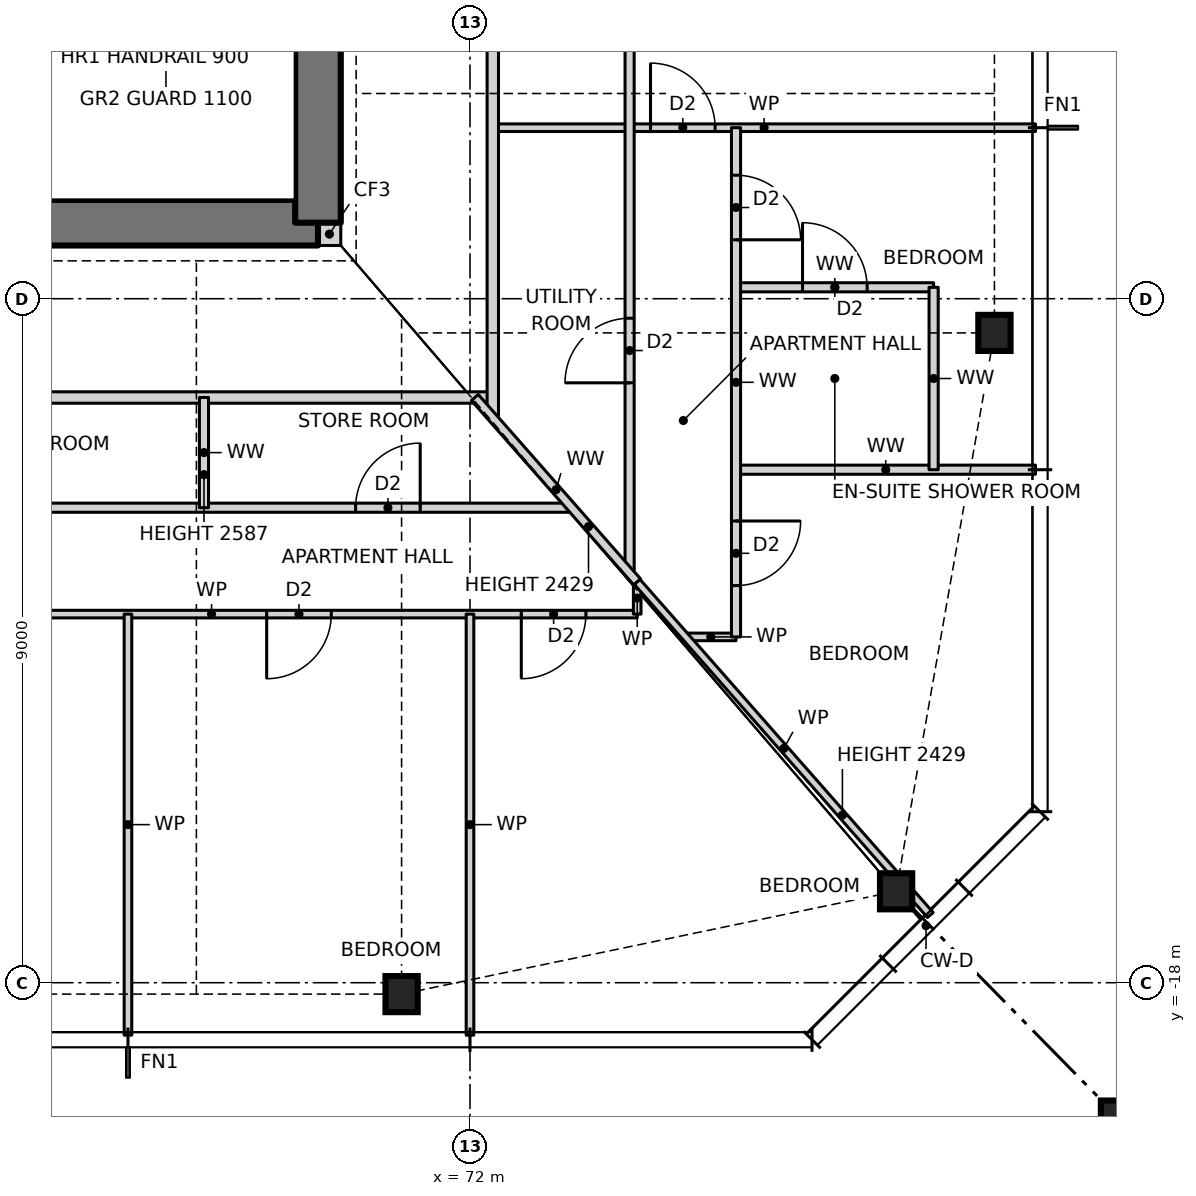
"""IFC4 building model, lengths in metres.
Left out: names, types, materials, properties, quantities, classifications, styles, units other than length and angle.
Written with IfcOpenShell. Run it as: python <this file> out.ifc"""

import sys

from ifc_helpers import new_model, si_unit, direction, frame, frame_2d, origin, origin_2d, place, context, subcontext, project, spatial, rectangle, hollow_rectangle, i_section, extrude, element, fill, save


model = new_model("IFC4")
c1 = context("Model", 3, precision=1e-05, world=origin(), true_north=direction((0.0, 1.0)))
c2 = subcontext(c1, "Body", "Model", "MODEL_VIEW")
j1 = project(units=[si_unit("LENGTHUNIT", "METRE"), si_unit("PLANEANGLEUNIT", "RADIAN")], contexts=[c1])
p1 = place(None, origin())
s1 = spatial("IfcSite", under=j1, at=p1, CompositionType="ELEMENT")
p2 = place(p1, origin())
s2 = spatial("IfcBuilding", under=s1, at=p2, CompositionType="ELEMENT")
p3 = place(p2, frame((0.0, 0.0, 46.5)))
s3 = spatial("IfcBuildingStorey", under=s2, at=p3, CompositionType="ELEMENT", Elevation=46.5)
for number, where, z_axis, x_axis in (
    (1, (71.1, -18.15, 0.0), (0.0, 0.0, 1.0), (1.0, 0.0, 0.0)),
    (2, (77.606, -16.797, 0.0), (0.0, 0.0, 1.0), (1.0, 0.0, 0.0)),
    (3, (78.9, -9.45, 0.0), (0.0, 0.0, 1.0), (1.0, 0.0, 0.0)),
):
    element("IfcColumn", number, at=place(p3, frame(where, z_axis=z_axis, x_axis=x_axis)), inside=s3, PredefinedType="COLUMN", context=c2, shape_type="SweptSolid", body=[
        extrude(i_section(OverallWidth=0.424, OverallDepth=0.475, WebThickness=0.048, FlangeThickness=0.077, at=origin_2d()), origin(), (0.0, 0.0, 1.0), 3.5),
    ])
p4 = place(p3, frame((80.9, -20.15, 0.0), z_axis=(0.0, 0.0, 1.0), x_axis=(1.0, 0.0, 0.0)))
e4 = element("IfcColumn", 4, at=p4, inside=s3, PredefinedType="COLUMN", context=c2, shape_type="SweptSolid", body=[
    extrude(hollow_rectangle(XDim=1.2, YDim=1.2, WallThickness=0.07, at=origin_2d()), origin(), (0.0, 0.0, 1.0), 3.5),
])
p5 = place(p3, frame((70.0, -8.15, 0.0), z_axis=(0.0, 0.0, 1.0), x_axis=(1.0, 0.0, 0.0)))
e5 = element("IfcWall", 5, at=p5, inside=s3, PredefinedType="SOLIDWALL", context=c2, shape_type="SweptSolid", body=[
    extrude(rectangle(XDim=0.3, YDim=0.3, at=frame_2d((0.15, 0.0))), origin(), (0.0, 0.0, 1.0), 3.5),
])
p6 = place(p3, frame((56.0, -8.0, 0.0), z_axis=(0.0, 0.0, 1.0), x_axis=(1.0, 0.0, 0.0)))
e6 = element("IfcWall", 6, at=p6, inside=s3, PredefinedType="SHEAR", context=c2, shape_type="SweptSolid", body=[
    extrude(rectangle(XDim=14.0, YDim=0.6, at=frame_2d((7.0, 0.0))), origin(), (0.0, 0.0, 1.0), 3.5),
])
p7 = place(p6, frame((2.7, 0.0, 0.0)))
e7 = element("IfcOpeningElement", 7, at=p7, cuts=e6, PredefinedType="OPENING", context=c2, shape_type="SweptSolid", body=[
    extrude(rectangle(XDim=0.9, YDim=2.1, at=frame_2d((0.45, 1.05))), frame((0.0, 0.31, 0.0), z_axis=(0.0, -1.0, 0.0), x_axis=(1.0, 0.0, 0.0)), (0.0, 0.0, 1.0), 0.62),
])
p8 = place(p6, frame((7.7, 0.0, 0.0)))
e8 = element("IfcOpeningElement", 8, at=p8, cuts=e6, PredefinedType="OPENING", context=c2, shape_type="SweptSolid", body=[
    extrude(rectangle(XDim=0.9, YDim=2.1, at=frame_2d((0.45, 1.05))), frame((0.0, 0.31, 0.0), z_axis=(0.0, -1.0, 0.0), x_axis=(1.0, 0.0, 0.0)), (0.0, 0.0, 1.0), 0.62),
])
p9 = place(p3, frame((70.0, -8.0, 0.0), z_axis=(0.0, 0.0, 1.0), x_axis=(0.0, 1.0, 0.0)))
e9 = element("IfcWall", 9, at=p9, inside=s3, PredefinedType="SHEAR", context=c2, shape_type="SweptSolid", body=[
    extrude(rectangle(XDim=16.0, YDim=0.6, at=frame_2d((8.0, 0.0))), origin(), (0.0, 0.0, 1.0), 3.5),
])
p10 = place(p9, frame((7.5, 0.0, 0.0)))
e10 = element("IfcOpeningElement", 10, at=p10, cuts=e9, PredefinedType="OPENING", context=c2, shape_type="SweptSolid", body=[
    extrude(rectangle(XDim=1.0, YDim=2.1, at=frame_2d((0.5, 1.05))), frame((0.0, 0.31, 0.0), z_axis=(0.0, -1.0, 0.0), x_axis=(1.0, 0.0, 0.0)), (0.0, 0.0, 1.0), 0.62),
])
p11 = place(p3, frame((74.836, -13.45, 0.0), z_axis=(0.0, 0.0, 1.0), x_axis=(1.0, 0.0, 0.0)))
e11 = element("IfcWall", 11, at=p11, inside=s3, PredefinedType="PARTITIONING", context=c2, shape_type="SweptSolid", body=[
    extrude(rectangle(XDim=0.664, YDim=0.1, at=frame_2d((0.332, 0.0))), origin(), (0.0, 0.0, 1.0), 3.27),
])
p12 = place(p3, frame((63.0, -13.15, 0.0), z_axis=(0.0, 0.0, 1.0), x_axis=(1.0, 0.0, 0.0)))
e12 = element("IfcWall", 12, at=p12, inside=s3, PredefinedType="PARTITIONING", context=c2, shape_type="SweptSolid", body=[
    extrude(rectangle(XDim=11.2, YDim=0.1, at=frame_2d((5.6, 0.0))), origin(), (0.0, 0.0, 1.0), 3.27),
])
p13 = place(p12, frame((1.825, 0.0, 0.0)))
e13 = element("IfcOpeningElement", 13, at=p13, cuts=e12, PredefinedType="OPENING", context=c2, shape_type="SweptSolid", body=[
    extrude(rectangle(XDim=0.85, YDim=2.1, at=frame_2d((0.425, 1.05))), frame((0.0, 0.06, 0.0), z_axis=(0.0, -1.0, 0.0), x_axis=(1.0, 0.0, 0.0)), (0.0, 0.0, 1.0), 0.12),
])
p14 = place(p12, frame((6.325, 0.0, 0.0)))
e14 = element("IfcOpeningElement", 14, at=p14, cuts=e12, PredefinedType="OPENING", context=c2, shape_type="SweptSolid", body=[
    extrude(rectangle(XDim=0.85, YDim=2.1, at=frame_2d((0.425, 1.05))), frame((0.0, 0.06, 0.0), z_axis=(0.0, -1.0, 0.0), x_axis=(1.0, 0.0, 0.0)), (0.0, 0.0, 1.0), 0.12),
])
p15 = place(p12, frame((9.675, 0.0, 0.0)))
e15 = element("IfcOpeningElement", 15, at=p15, cuts=e12, PredefinedType="OPENING", context=c2, shape_type="SweptSolid", body=[
    extrude(rectangle(XDim=0.85, YDim=2.1, at=frame_2d((0.425, 1.05))), frame((0.0, 0.06, 0.0), z_axis=(0.0, -1.0, 0.0), x_axis=(1.0, 0.0, 0.0)), (0.0, 0.0, 1.0), 0.12),
])
p16 = place(p3, frame((54.0, -11.75, 0.0), z_axis=(0.0, 0.0, 1.0), x_axis=(1.0, 0.0, 0.0)))
e16 = element("IfcWall", 16, at=p16, inside=s3, PredefinedType="PARTITIONING", context=c2, shape_type="SweptSolid", body=[
    extrude(rectangle(XDim=19.34, YDim=0.12, at=frame_2d((9.67, 0.0))), origin(), (0.0, 0.0, 1.0), 3.27),
])
p17 = place(p16, frame((1.375, 0.0, 0.0)))
e17 = element("IfcOpeningElement", 17, at=p17, cuts=e16, PredefinedType="OPENING", context=c2, shape_type="SweptSolid", body=[
    extrude(rectangle(XDim=0.85, YDim=2.1, at=frame_2d((0.425, 1.05))), frame((0.0, 0.07, 0.0), z_axis=(0.0, -1.0, 0.0), x_axis=(1.0, 0.0, 0.0)), (0.0, 0.0, 1.0), 0.14),
])
p18 = place(p16, frame((4.575, 0.0, 0.0)))
e18 = element("IfcOpeningElement", 18, at=p18, cuts=e16, PredefinedType="OPENING", context=c2, shape_type="SweptSolid", body=[
    extrude(rectangle(XDim=0.85, YDim=2.1, at=frame_2d((0.425, 1.05))), frame((0.0, 0.07, 0.0), z_axis=(0.0, -1.0, 0.0), x_axis=(1.0, 0.0, 0.0)), (0.0, 0.0, 1.0), 0.14),
])
p19 = place(p16, frame((11.325, 0.0, 0.0)))
e19 = element("IfcOpeningElement", 19, at=p19, cuts=e16, PredefinedType="OPENING", context=c2, shape_type="SweptSolid", body=[
    extrude(rectangle(XDim=0.85, YDim=2.1, at=frame_2d((0.425, 1.05))), frame((0.0, 0.07, 0.0), z_axis=(0.0, -1.0, 0.0), x_axis=(1.0, 0.0, 0.0)), (0.0, 0.0, 1.0), 0.14),
])
p20 = place(p16, frame((16.495, 0.0, 0.0)))
e20 = element("IfcOpeningElement", 20, at=p20, cuts=e16, PredefinedType="OPENING", context=c2, shape_type="SweptSolid", body=[
    extrude(rectangle(XDim=0.85, YDim=2.1, at=frame_2d((0.425, 1.05))), frame((0.0, 0.07, 0.0), z_axis=(0.0, -1.0, 0.0), x_axis=(1.0, 0.0, 0.0)), (0.0, 0.0, 1.0), 0.14),
])
p21 = place(p3, frame((75.5, -11.25, 0.0), z_axis=(0.0, 0.0, 1.0), x_axis=(1.0, 0.0, 0.0)))
e21 = element("IfcWall", 21, at=p21, inside=s3, PredefinedType="PARTITIONING", context=c2, shape_type="SweptSolid", body=[
    extrude(rectangle(XDim=3.94, YDim=0.12, at=frame_2d((1.97, 0.0))), origin(), (0.0, 0.0, 1.0), 3.27),
])
p22 = place(p3, frame((53.7, -10.3, 0.0), z_axis=(0.0, 0.0, 1.0), x_axis=(1.0, 0.0, 0.0)))
e22 = element("IfcWall", 22, at=p22, inside=s3, PredefinedType="PARTITIONING", context=c2, shape_type="SweptSolid", body=[
    extrude(rectangle(XDim=18.6, YDim=0.15, at=frame_2d((9.3, 0.0))), origin(), (0.0, 0.0, 1.0), 3.27),
])
p23 = place(p22, frame((4.8, 0.0, 0.0)))
e23 = element("IfcOpeningElement", 23, at=p23, cuts=e22, PredefinedType="OPENING", context=c2, shape_type="SweptSolid", body=[
    extrude(rectangle(XDim=1.0, YDim=2.1, at=frame_2d((0.5, 1.05))), frame((0.0, 0.085, 0.0), z_axis=(0.0, -1.0, 0.0), x_axis=(1.0, 0.0, 0.0)), (0.0, 0.0, 1.0), 0.17),
])
p24 = place(p3, frame((75.5, -8.85, 0.0), z_axis=(0.0, 0.0, 1.0), x_axis=(1.0, 0.0, 0.0)))
e24 = element("IfcWall", 24, at=p24, inside=s3, PredefinedType="PARTITIONING", context=c2, shape_type="SweptSolid", body=[
    extrude(rectangle(XDim=2.6, YDim=0.12, at=frame_2d((1.3, 0.0))), origin(), (0.0, 0.0, 1.0), 3.27),
])
p25 = place(p24, frame((0.875, 0.0, 0.0)))
e25 = element("IfcOpeningElement", 25, at=p25, cuts=e24, PredefinedType="OPENING", context=c2, shape_type="SweptSolid", body=[
    extrude(rectangle(XDim=0.85, YDim=2.1, at=frame_2d((0.425, 1.05))), frame((0.0, 0.07, 0.0), z_axis=(0.0, -1.0, 0.0), x_axis=(1.0, 0.0, 0.0)), (0.0, 0.0, 1.0), 0.14),
])
p26 = place(p3, frame((72.3, -6.75, 0.0), z_axis=(0.0, 0.0, 1.0), x_axis=(1.0, 0.0, 0.0)))
e26 = element("IfcWall", 26, at=p26, inside=s3, PredefinedType="PARTITIONING", context=c2, shape_type="SweptSolid", body=[
    extrude(rectangle(XDim=7.14, YDim=0.1, at=frame_2d((3.57, 0.0))), origin(), (0.0, 0.0, 1.0), 3.27),
])
p27 = place(p26, frame((2.075, 0.0, 0.0)))
e27 = element("IfcOpeningElement", 27, at=p27, cuts=e26, PredefinedType="OPENING", context=c2, shape_type="SweptSolid", body=[
    extrude(rectangle(XDim=0.85, YDim=2.1, at=frame_2d((0.425, 1.05))), frame((0.0, 0.06, 0.0), z_axis=(0.0, -1.0, 0.0), x_axis=(1.0, 0.0, 0.0)), (0.0, 0.0, 1.0), 0.12),
])
p28 = place(p3, frame((78.1, -11.25, 0.0), z_axis=(0.0, 0.0, 1.0), x_axis=(0.0, 1.0, 0.0)))
e28 = element("IfcWall", 28, at=p28, inside=s3, PredefinedType="PARTITIONING", context=c2, shape_type="SweptSolid", body=[
    extrude(rectangle(XDim=2.4, YDim=0.12, at=frame_2d((1.2, 0.0))), origin(), (0.0, 0.0, 1.0), 3.27),
])
p29 = place(p3, frame((75.5, -13.45, 0.0), z_axis=(0.0, 0.0, 1.0), x_axis=(0.0, 1.0, 0.0)))
e29 = element("IfcWall", 29, at=p29, inside=s3, PredefinedType="PARTITIONING", context=c2, shape_type="SweptSolid", body=[
    extrude(rectangle(XDim=6.7, YDim=0.12, at=frame_2d((3.35, 0.0))), origin(), (0.0, 0.0, 1.0), 3.27),
])
p30 = place(p29, frame((5.225, 0.0, 0.0)))
e30 = element("IfcOpeningElement", 30, at=p30, cuts=e29, PredefinedType="OPENING", context=c2, shape_type="SweptSolid", body=[
    extrude(rectangle(XDim=0.85, YDim=2.1, at=frame_2d((0.425, 1.05))), frame((0.0, 0.07, 0.0), z_axis=(0.0, -1.0, 0.0), x_axis=(1.0, 0.0, 0.0)), (0.0, 0.0, 1.0), 0.14),
])
p31 = place(p29, frame((0.675, 0.0, 0.0)))
e31 = element("IfcOpeningElement", 31, at=p31, cuts=e29, PredefinedType="OPENING", context=c2, shape_type="SweptSolid", body=[
    extrude(rectangle(XDim=0.85, YDim=2.1, at=frame_2d((0.425, 1.05))), frame((0.0, 0.07, 0.0), z_axis=(0.0, -1.0, 0.0), x_axis=(1.0, 0.0, 0.0)), (0.0, 0.0, 1.0), 0.14),
])
p32 = place(p3, frame((74.2, -13.15, 0.0), z_axis=(0.0, 0.0, 1.0), x_axis=(0.0, 1.0, 0.0)))
e32 = element("IfcWall", 32, at=p32, inside=s3, PredefinedType="PARTITIONING", context=c2, shape_type="SweptSolid", body=[
    extrude(rectangle(XDim=0.423, YDim=0.1, at=frame_2d((0.211, 0.0))), origin(), (0.0, 0.0, 1.0), 3.27),
])
p33 = place(p3, frame((74.1, -12.614, 0.0), z_axis=(0.0, 0.0, 1.0), x_axis=(0.0, 1.0, 0.0)))
e33 = element("IfcWall", 33, at=p33, inside=s3, PredefinedType="PARTITIONING", context=c2, shape_type="SweptSolid", body=[
    extrude(rectangle(XDim=25.228, YDim=0.12, at=frame_2d((12.614, 0.0))), origin(), (0.0, 0.0, 1.0), 3.27),
])
p34 = place(p33, frame((7.239, 0.0, 0.0)))
e34 = element("IfcOpeningElement", 34, at=p34, cuts=e33, PredefinedType="OPENING", context=c2, shape_type="SweptSolid", body=[
    extrude(rectangle(XDim=0.85, YDim=2.1, at=frame_2d((0.425, 1.05))), frame((0.0, 0.07, 0.0), z_axis=(0.0, -1.0, 0.0), x_axis=(1.0, 0.0, 0.0)), (0.0, 0.0, 1.0), 0.14),
])
p35 = place(p33, frame((10.439, 0.0, 0.0)))
e35 = element("IfcOpeningElement", 35, at=p35, cuts=e33, PredefinedType="OPENING", context=c2, shape_type="SweptSolid", body=[
    extrude(rectangle(XDim=0.85, YDim=2.1, at=frame_2d((0.425, 1.05))), frame((0.0, 0.07, 0.0), z_axis=(0.0, -1.0, 0.0), x_axis=(1.0, 0.0, 0.0)), (0.0, 0.0, 1.0), 0.14),
])
p36 = place(p33, frame((2.507, 0.0, 0.0)))
e36 = element("IfcOpeningElement", 36, at=p36, cuts=e33, PredefinedType="OPENING", context=c2, shape_type="SweptSolid", body=[
    extrude(rectangle(XDim=0.85, YDim=2.1, at=frame_2d((0.425, 1.05))), frame((0.0, 0.07, 0.0), z_axis=(0.0, -1.0, 0.0), x_axis=(1.0, 0.0, 0.0)), (0.0, 0.0, 1.0), 0.14),
])
p37 = place(p33, frame((16.639, 0.0, 0.0)))
e37 = element("IfcOpeningElement", 37, at=p37, cuts=e33, PredefinedType="OPENING", context=c2, shape_type="SweptSolid", body=[
    extrude(rectangle(XDim=0.85, YDim=2.1, at=frame_2d((0.425, 1.05))), frame((0.0, 0.07, 0.0), z_axis=(0.0, -1.0, 0.0), x_axis=(1.0, 0.0, 0.0)), (0.0, 0.0, 1.0), 0.14),
])
p38 = place(p33, frame((21.821, 0.0, 0.0)))
e38 = element("IfcOpeningElement", 38, at=p38, cuts=e33, PredefinedType="OPENING", context=c2, shape_type="SweptSolid", body=[
    extrude(rectangle(XDim=0.85, YDim=2.1, at=frame_2d((0.425, 1.05))), frame((0.0, 0.07, 0.0), z_axis=(0.0, -1.0, 0.0), x_axis=(1.0, 0.0, 0.0)), (0.0, 0.0, 1.0), 0.14),
])
p39 = place(p3, frame((72.3, -10.568, 0.0), z_axis=(0.0, 0.0, 1.0), x_axis=(0.0, 1.0, 0.0)))
e39 = element("IfcWall", 39, at=p39, inside=s3, PredefinedType="PARTITIONING", context=c2, shape_type="SweptSolid", body=[
    extrude(rectangle(XDim=21.136, YDim=0.15, at=frame_2d((10.568, 0.0))), origin(), (0.0, 0.0, 1.0), 3.27),
])
p40 = place(p39, frame((8.318, 0.0, 0.0)))
e40 = element("IfcOpeningElement", 40, at=p40, cuts=e39, PredefinedType="OPENING", context=c2, shape_type="SweptSolid", body=[
    extrude(rectangle(XDim=1.0, YDim=2.1, at=frame_2d((0.5, 1.05))), frame((0.0, 0.085, 0.0), z_axis=(0.0, -1.0, 0.0), x_axis=(1.0, 0.0, 0.0)), (0.0, 0.0, 1.0), 0.17),
])
p41 = place(p3, frame((72.0, -18.69, 0.0), z_axis=(0.0, 0.0, 1.0), x_axis=(0.0, 1.0, 0.0)))
e41 = element("IfcWall", 41, at=p41, inside=s3, PredefinedType="PARTITIONING", context=c2, shape_type="SweptSolid", body=[
    extrude(rectangle(XDim=5.54, YDim=0.1, at=frame_2d((2.77, 0.0))), origin(), (0.0, 0.0, 1.0), 3.27),
])
p42 = place(p3, frame((68.5, -11.75, 0.0), z_axis=(0.0, 0.0, 1.0), x_axis=(0.0, 1.0, 0.0)))
e42 = element("IfcWall", 42, at=p42, inside=s3, PredefinedType="PARTITIONING", context=c2, shape_type="SweptSolid", body=[
    extrude(rectangle(XDim=1.45, YDim=0.12, at=frame_2d((0.725, 0.0))), origin(), (0.0, 0.0, 1.0), 2.587),
])
p43 = place(p3, frame((67.5, -18.69, 0.0), z_axis=(0.0, 0.0, 1.0), x_axis=(0.0, 1.0, 0.0)))
e43 = element("IfcWall", 43, at=p43, inside=s3, PredefinedType="PARTITIONING", context=c2, shape_type="SweptSolid", body=[
    extrude(rectangle(XDim=5.54, YDim=0.1, at=frame_2d((2.77, 0.0))), origin(), (0.0, 0.0, 1.0), 3.27),
])
p44 = place(p3, frame((74.2, -12.727, 0.0), z_axis=(0.0, 0.0, 1.0), x_axis=(-0.660667046586, 0.75067906162, 0.0)))
e44 = element("IfcWall", 44, at=p44, inside=s3, PredefinedType="PARTITIONING", context=c2, shape_type="SweptSolid", body=[
    extrude(rectangle(XDim=3.233, YDim=0.12, at=frame_2d((1.617, 0.0))), origin(), (0.0, 0.0, 1.0), 2.429),
])
p45 = place(p3, frame((78.057, -17.109, 0.0), z_axis=(0.0, 0.0, 1.0), x_axis=(-0.660698595885, 0.750651294141, 0.0)))
e45 = element("IfcWall", 45, at=p45, inside=s3, PredefinedType="PARTITIONING", context=c2, shape_type="SweptSolid", body=[
    extrude(rectangle(XDim=5.838, YDim=0.1, at=frame_2d((2.919, 0.0))), origin(), (0.0, 0.0, 1.0), 2.429),
])
p46 = place(p14, frame((0.85, 0.0, 0.0), z_axis=(0.0, 0.0, 1.0), x_axis=(-1.0, 0.0, 0.0)))
e46 = element("IfcDoor", 46, at=p46, inside=s3, OperationType="SINGLE_SWING_RIGHT", PredefinedType="DOOR", context=c2, shape_type="SweptSolid", body=[
    extrude(rectangle(XDim=0.85, YDim=2.1, at=frame_2d((0.425, 1.05))), frame((0.0, 0.025, 0.0), z_axis=(0.0, -1.0, 0.0), x_axis=(1.0, 0.0, 0.0)), (0.0, 0.0, 1.0), 0.05),
])
fill(e14, e46)
p47 = place(p15, frame((0.85, 0.0, 0.0), z_axis=(0.0, 0.0, 1.0), x_axis=(-1.0, 0.0, 0.0)))
e47 = element("IfcDoor", 47, at=p47, inside=s3, OperationType="SINGLE_SWING_RIGHT", PredefinedType="DOOR", context=c2, shape_type="SweptSolid", body=[
    extrude(rectangle(XDim=0.85, YDim=2.1, at=frame_2d((0.425, 1.05))), frame((0.0, 0.025, 0.0), z_axis=(0.0, -1.0, 0.0), x_axis=(1.0, 0.0, 0.0)), (0.0, 0.0, 1.0), 0.05),
])
fill(e15, e47)
p48 = place(p20, origin())
e48 = element("IfcDoor", 48, at=p48, inside=s3, OperationType="SINGLE_SWING_RIGHT", PredefinedType="DOOR", context=c2, shape_type="SweptSolid", body=[
    extrude(rectangle(XDim=0.85, YDim=2.1, at=frame_2d((0.425, 1.05))), frame((0.0, 0.025, 0.0), z_axis=(0.0, -1.0, 0.0), x_axis=(1.0, 0.0, 0.0)), (0.0, 0.0, 1.0), 0.05),
])
fill(e20, e48)
p49 = place(p27, origin())
e49 = element("IfcDoor", 49, at=p49, inside=s3, OperationType="SINGLE_SWING_LEFT", PredefinedType="DOOR", context=c2, shape_type="SweptSolid", body=[
    extrude(rectangle(XDim=0.85, YDim=2.1, at=frame_2d((0.425, 1.05))), frame((0.0, 0.025, 0.0), z_axis=(0.0, -1.0, 0.0), x_axis=(1.0, 0.0, 0.0)), (0.0, 0.0, 1.0), 0.05),
])
fill(e27, e49)
p50 = place(p25, origin())
e50 = element("IfcDoor", 50, at=p50, inside=s3, OperationType="SINGLE_SWING_LEFT", PredefinedType="DOOR", context=c2, shape_type="SweptSolid", body=[
    extrude(rectangle(XDim=0.85, YDim=2.1, at=frame_2d((0.425, 1.05))), frame((0.0, 0.025, 0.0), z_axis=(0.0, -1.0, 0.0), x_axis=(1.0, 0.0, 0.0)), (0.0, 0.0, 1.0), 0.05),
])
fill(e25, e50)
p51 = place(p30, frame((0.85, 0.0, 0.0), z_axis=(0.0, 0.0, 1.0), x_axis=(-1.0, 0.0, 0.0)))
e51 = element("IfcDoor", 51, at=p51, inside=s3, OperationType="SINGLE_SWING_RIGHT", PredefinedType="DOOR", context=c2, shape_type="SweptSolid", body=[
    extrude(rectangle(XDim=0.85, YDim=2.1, at=frame_2d((0.425, 1.05))), frame((0.0, 0.025, 0.0), z_axis=(0.0, -1.0, 0.0), x_axis=(1.0, 0.0, 0.0)), (0.0, 0.0, 1.0), 0.05),
])
fill(e30, e51)
p52 = place(p31, frame((0.85, 0.0, 0.0), z_axis=(0.0, 0.0, 1.0), x_axis=(-1.0, 0.0, 0.0)))
e52 = element("IfcDoor", 52, at=p52, inside=s3, OperationType="SINGLE_SWING_LEFT", PredefinedType="DOOR", context=c2, shape_type="SweptSolid", body=[
    extrude(rectangle(XDim=0.85, YDim=2.1, at=frame_2d((0.425, 1.05))), frame((0.0, 0.025, 0.0), z_axis=(0.0, -1.0, 0.0), x_axis=(1.0, 0.0, 0.0)), (0.0, 0.0, 1.0), 0.05),
])
fill(e31, e52)
p53 = place(p36, origin())
e53 = element("IfcDoor", 53, at=p53, inside=s3, OperationType="SINGLE_SWING_LEFT", PredefinedType="DOOR", context=c2, shape_type="SweptSolid", body=[
    extrude(rectangle(XDim=0.85, YDim=2.1, at=frame_2d((0.425, 1.05))), frame((0.0, 0.025, 0.0), z_axis=(0.0, -1.0, 0.0), x_axis=(1.0, 0.0, 0.0)), (0.0, 0.0, 1.0), 0.05),
])
fill(e36, e53)
save(model, sys.argv[1])
